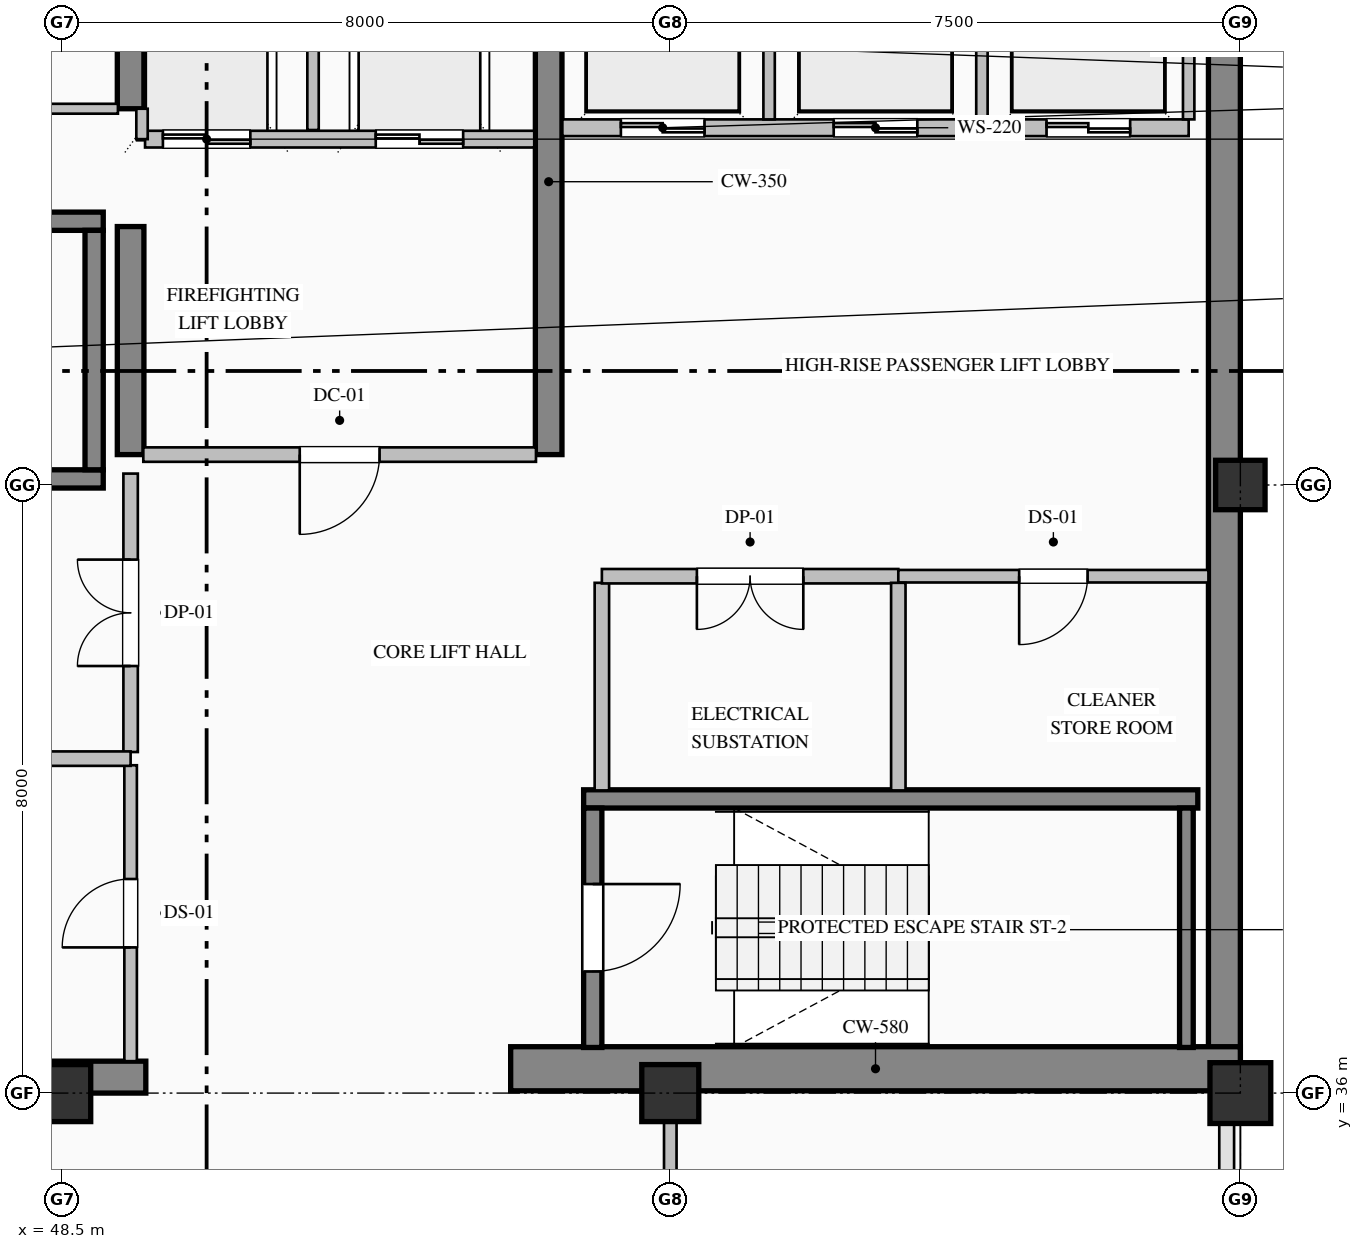
"""IFC4 building model, lengths in metres.
Left out: names, types, materials, properties, quantities, classifications, styles, units other than length and angle.
Written with IfcOpenShell. Run it as: python <this file> out.ifc"""

import sys

from ifc_helpers import new_model, si_unit, direction, frame, frame_2d, origin, origin_2d, place, context, subcontext, project, spatial, rectangle, hollow_rectangle, extrude, element, fill, save


model = new_model("IFC4")
c1 = context("Model", 3, precision=1e-05, world=origin(), true_north=direction((0.0, 1.0)))
c2 = subcontext(c1, "Body", "Model", "MODEL_VIEW")
j1 = project(units=[si_unit("LENGTHUNIT", "METRE"), si_unit("PLANEANGLEUNIT", "RADIAN")], contexts=[c1])
p1 = place(None, origin())
s1 = spatial("IfcSite", under=j1, at=p1, CompositionType="ELEMENT")
p2 = place(p1, origin())
s2 = spatial("IfcBuilding", under=s1, at=p2, CompositionType="ELEMENT")
p3 = place(p2, frame((0.0, 0.0, 299.2)))
s3 = spatial("IfcBuildingStorey", under=s2, at=p3, CompositionType="ELEMENT", Elevation=299.2)
p4 = place(p3, frame((63.79, 36.32, 0.0), z_axis=(0.0, 0.0, 1.0), x_axis=(0.0, 1.0, 0.0)))
e1 = element("IfcWall", 1, at=p4, inside=s3, PredefinedType="SHEAR", context=c2, shape_type="SweptSolid", body=[
    extrude(rectangle(XDim=15.26, YDim=0.42, at=frame_2d((7.63, 0.0))), origin(), (0.0, 0.0, 1.0), 3.785),
])
p5 = place(p3, frame((40.5, 36.21, 0.0), z_axis=(0.0, 0.0, 1.0), x_axis=(1.0, 0.0, 0.0)))
e2 = element("IfcWall", 2, at=p5, inside=s3, PredefinedType="SHEAR", context=c2, shape_type="SweptSolid", body=[
    extrude(rectangle(XDim=9.1, YDim=0.42, at=frame_2d((4.55, 0.0))), origin(), (0.0, 0.0, 1.0), 3.785),
])
p6 = place(p3, frame((54.4, 36.32, 0.0), z_axis=(0.0, 0.0, 1.0), x_axis=(1.0, 0.0, 0.0)))
e3 = element("IfcWall", 3, at=p6, inside=s3, PredefinedType="SHEAR", context=c2, shape_type="SweptSolid", body=[
    extrude(rectangle(XDim=9.6, YDim=0.58, at=frame_2d((4.8, 0.0))), origin(), (0.0, 0.0, 1.0), 4.0),
])
p7 = place(p3, frame((49.4, 44.4, 0.0), z_axis=(0.0, 0.0, 1.0), x_axis=(0.0, 1.0, 0.0)))
e4 = element("IfcWall", 4, at=p7, inside=s3, PredefinedType="SHEAR", context=c2, shape_type="SweptSolid", body=[
    extrude(rectangle(XDim=3.0, YDim=0.35, at=frame_2d((1.5, 0.0))), origin(), (0.0, 0.0, 1.0), 3.785),
])
p8 = place(p3, frame((49.4, 48.95, 0.0), z_axis=(0.0, 0.0, 1.0), x_axis=(0.0, 1.0, 0.0)))
e5 = element("IfcWall", 5, at=p8, inside=s3, PredefinedType="SHEAR", context=c2, shape_type="SweptSolid", body=[
    extrude(rectangle(XDim=2.63, YDim=0.35, at=frame_2d((1.315, 0.0))), origin(), (0.0, 0.0, 1.0), 3.785),
])
p9 = place(p3, frame((54.9, 44.4, 0.0), z_axis=(0.0, 0.0, 1.0), x_axis=(0.0, 1.0, 0.0)))
e6 = element("IfcWall", 6, at=p9, inside=s3, PredefinedType="SHEAR", context=c2, shape_type="SweptSolid", body=[
    extrude(rectangle(XDim=7.18, YDim=0.35, at=frame_2d((3.59, 0.0))), origin(), (0.0, 0.0, 1.0), 3.785),
])
for number, where, z_axis, x_axis in (
    (7, (48.5, 36.0, 0.0), (0.0, 0.0, 1.0), (1.0, 0.0, 0.0)),
    (8, (56.5, 36.0, 0.0), (0.0, 0.0, 1.0), (1.0, 0.0, 0.0)),
):
    element("IfcColumn", number, at=place(p3, frame(where, z_axis=z_axis, x_axis=x_axis)), inside=s3, PredefinedType="COLUMN", context=c2, shape_type="SweptSolid", body=[
        extrude(rectangle(XDim=0.75, YDim=0.75, at=origin_2d()), origin(), (0.0, 0.0, 1.0), 4.0),
    ])
p10 = place(p3, frame((64.0, 36.0, 0.0), z_axis=(0.0, 0.0, 1.0), x_axis=(1.0, 0.0, 0.0)))
e9 = element("IfcColumn", 9, at=p10, inside=s3, PredefinedType="COLUMN", context=c2, shape_type="SweptSolid", body=[
    extrude(hollow_rectangle(XDim=0.8, YDim=0.8, WallThickness=0.032, at=origin_2d()), origin(), (0.0, 0.0, 1.0), 4.0),
])
p11 = place(p3, frame((64.0, 44.0, 0.0), z_axis=(0.0, 0.0, 1.0), x_axis=(1.0, 0.0, 0.0)))
e10 = element("IfcColumn", 10, at=p11, inside=s3, PredefinedType="COLUMN", context=c2, shape_type="SweptSolid", body=[
    extrude(hollow_rectangle(XDim=0.65, YDim=0.65, WallThickness=0.028, at=origin_2d()), origin(), (0.0, 0.0, 1.0), 4.0),
])
for number, where, z_axis, x_axis in (
    (11, (40.96, 47.47, 0.0), (0.0, 0.0, 1.0), (1.0, 0.0, 0.0)),
    (12, (49.04, 44.08, 0.0), (0.0, 0.0, 1.0), (-1.0, 0.0, 0.0)),
):
    element("IfcWall", number, at=place(p3, frame(where, z_axis=z_axis, x_axis=x_axis)), inside=s3, PredefinedType="SOLIDWALL", context=c2, shape_type="SweptSolid", body=[
        extrude(rectangle(XDim=8.08, YDim=0.24, at=frame_2d((4.04, 0.0))), origin(), (0.0, 0.0, 1.0), 4.0),
    ])
p12 = place(p3, frame((48.92, 44.2, 0.0), z_axis=(0.0, 0.0, 1.0), x_axis=(0.0, 1.0, 0.0)))
e13 = element("IfcWall", 13, at=p12, inside=s3, PredefinedType="SOLIDWALL", context=c2, shape_type="SweptSolid", body=[
    extrude(rectangle(XDim=3.15, YDim=0.24, at=frame_2d((1.575, 0.0))), origin(), (0.0, 0.0, 1.0), 4.0),
])
p13 = place(p3, frame((55.36, 39.87, 0.0), z_axis=(0.0, 0.0, 1.0), x_axis=(1.0, 0.0, 0.0)))
e14 = element("IfcWall", 14, at=p13, inside=s3, PredefinedType="SOLIDWALL", context=c2, shape_type="SweptSolid", body=[
    extrude(rectangle(XDim=8.08, YDim=0.24, at=frame_2d((4.04, 0.0))), origin(), (0.0, 0.0, 1.0), 4.0),
])
p14 = place(p3, frame((55.48, 39.75, 0.0), z_axis=(0.0, 0.0, 1.0), x_axis=(0.0, -1.0, 0.0)))
e15 = element("IfcWall", 15, at=p14, inside=s3, PredefinedType="SOLIDWALL", context=c2, shape_type="SweptSolid", body=[
    extrude(rectangle(XDim=3.15, YDim=0.24, at=frame_2d((1.575, 0.0))), origin(), (0.0, 0.0, 1.0), 4.0),
])
p15 = place(p14, frame((1.0, 0.0, 0.0)))
e16 = element("IfcOpeningElement", 16, at=p15, cuts=e15, PredefinedType="OPENING", context=c2, shape_type="SweptSolid", body=[
    extrude(rectangle(XDim=1.15, YDim=2.2, at=frame_2d((0.575, 1.1))), frame((0.0, 0.13, 0.0), z_axis=(0.0, -1.0, 0.0), x_axis=(1.0, 0.0, 0.0)), (0.0, 0.0, 1.0), 0.26),
])
p16 = place(p3, frame((63.29, 36.6, 0.0), z_axis=(0.0, 0.0, 1.0), x_axis=(0.0, 1.0, 0.0)))
e17 = element("IfcWall", 17, at=p16, inside=s3, PredefinedType="SOLIDWALL", context=c2, shape_type="SweptSolid", body=[
    extrude(rectangle(XDim=3.15, YDim=0.18, at=frame_2d((1.575, 0.0))), origin(), (0.0, 0.0, 1.0), 4.0),
])
p17 = place(p3, frame((54.71, 48.55, 0.0), z_axis=(0.0, 0.0, 1.0), x_axis=(-1.0, 0.0, 0.0)))
e18 = element("IfcWall", 18, at=p17, inside=s3, PredefinedType="PARTITIONING", context=c2, shape_type="SweptSolid", body=[
    extrude(rectangle(XDim=5.12, YDim=0.22, at=frame_2d((2.56, 0.0))), origin(), (0.0, 0.0, 1.0), 3.785),
])
p18 = place(p17, frame((3.735, 0.0, 0.0)))
e19 = element("IfcOpeningElement", 19, at=p18, cuts=e18, PredefinedType="OPENING", context=c2, shape_type="SweptSolid", body=[
    extrude(rectangle(XDim=1.15, YDim=2.2, at=frame_2d((0.575, 1.1))), frame((0.0, 0.12, 0.0), z_axis=(0.0, -1.0, 0.0), x_axis=(1.0, 0.0, 0.0)), (0.0, 0.0, 1.0), 0.24),
])
p19 = place(p17, frame((0.935, 0.0, 0.0)))
e20 = element("IfcOpeningElement", 20, at=p19, cuts=e18, PredefinedType="OPENING", context=c2, shape_type="SweptSolid", body=[
    extrude(rectangle(XDim=1.15, YDim=2.2, at=frame_2d((0.575, 1.1))), frame((0.0, 0.12, 0.0), z_axis=(0.0, -1.0, 0.0), x_axis=(1.0, 0.0, 0.0)), (0.0, 0.0, 1.0), 0.24),
])
p20 = place(p3, frame((51.8, 48.67, 0.0), z_axis=(0.0, 0.0, 1.0), x_axis=(0.0, 1.0, 0.0)))
e21 = element("IfcWall", 21, at=p20, inside=s3, PredefinedType="PARTITIONING", context=c2, shape_type="SweptSolid", body=[
    extrude(rectangle(XDim=2.91, YDim=0.15, at=frame_2d((1.455, 0.0))), origin(), (0.0, 0.0, 1.0), 3.785),
])
p21 = place(p3, frame((49.55, 48.55, 0.0), z_axis=(0.0, 0.0, 1.0), x_axis=(0.0, 1.0, 0.0)))
e22 = element("IfcWall", 22, at=p21, inside=s3, PredefinedType="PARTITIONING", context=c2, shape_type="SweptSolid", body=[
    extrude(rectangle(XDim=0.4, YDim=0.15, at=frame_2d((0.2, 0.0))), origin(), (0.0, 0.0, 1.0), 3.785),
])
p22 = place(p3, frame((63.32, 48.7, 0.0), z_axis=(0.0, 0.0, 1.0), x_axis=(-1.0, 0.0, 0.0)))
e23 = element("IfcWall", 23, at=p22, inside=s3, PredefinedType="PARTITIONING", context=c2, shape_type="SweptSolid", body=[
    extrude(rectangle(XDim=8.24, YDim=0.22, at=frame_2d((4.12, 0.0))), origin(), (0.0, 0.0, 1.0), 3.785),
])
p23 = place(p22, frame((6.37, 0.0, 0.0)))
e24 = element("IfcOpeningElement", 24, at=p23, cuts=e23, PredefinedType="OPENING", context=c2, shape_type="SweptSolid", body=[
    extrude(rectangle(XDim=1.1, YDim=2.2, at=frame_2d((0.55, 1.1))), frame((0.0, 0.12, 0.0), z_axis=(0.0, -1.0, 0.0), x_axis=(1.0, 0.0, 0.0)), (0.0, 0.0, 1.0), 0.24),
])
p24 = place(p22, frame((3.57, 0.0, 0.0)))
e25 = element("IfcOpeningElement", 25, at=p24, cuts=e23, PredefinedType="OPENING", context=c2, shape_type="SweptSolid", body=[
    extrude(rectangle(XDim=1.1, YDim=2.2, at=frame_2d((0.55, 1.1))), frame((0.0, 0.12, 0.0), z_axis=(0.0, -1.0, 0.0), x_axis=(1.0, 0.0, 0.0)), (0.0, 0.0, 1.0), 0.24),
])
p25 = place(p22, frame((0.77, 0.0, 0.0)))
e26 = element("IfcOpeningElement", 26, at=p25, cuts=e23, PredefinedType="OPENING", context=c2, shape_type="SweptSolid", body=[
    extrude(rectangle(XDim=1.1, YDim=2.2, at=frame_2d((0.55, 1.1))), frame((0.0, 0.12, 0.0), z_axis=(0.0, -1.0, 0.0), x_axis=(1.0, 0.0, 0.0)), (0.0, 0.0, 1.0), 0.24),
])
for number, where, z_axis, x_axis in (
    (27, (57.8, 48.81, 0.0), (0.0, 0.0, 1.0), (0.0, 1.0, 0.0)),
    (28, (60.6, 48.81, 0.0), (0.0, 0.0, 1.0), (0.0, 1.0, 0.0)),
    (29, (63.32, 48.81, 0.0), (0.0, 0.0, 1.0), (0.0, 1.0, 0.0)),
):
    element("IfcWall", number, at=place(p3, frame(where, z_axis=z_axis, x_axis=x_axis)), inside=s3, PredefinedType="PARTITIONING", context=c2, shape_type="SweptSolid", body=[
        extrude(rectangle(XDim=2.77, YDim=0.15, at=frame_2d((1.385, 0.0))), origin(), (0.0, 0.0, 1.0), 3.785),
    ])
p26 = place(p3, frame((45.2, 48.95, 0.0), z_axis=(0.0, 0.0, 1.0), x_axis=(1.0, 0.0, 0.0)))
e30 = element("IfcWall", 30, at=p26, inside=s3, PredefinedType="PARTITIONING", context=c2, shape_type="SweptSolid", body=[
    extrude(rectangle(XDim=4.033, YDim=0.13, at=frame_2d((2.017, 0.0))), origin(), (0.0, 0.0, 1.0), 3.785),
])
p27 = place(p26, frame((1.556, 0.0, 0.0)))
e31 = element("IfcOpeningElement", 31, at=p27, cuts=e30, PredefinedType="OPENING", context=c2, shape_type="SweptSolid", body=[
    extrude(rectangle(XDim=0.92, YDim=2.15, at=frame_2d((0.46, 1.075))), frame((0.0, 0.075, 0.0), z_axis=(0.0, -1.0, 0.0), x_axis=(1.0, 0.0, 0.0)), (0.0, 0.0, 1.0), 0.15),
])
p28 = place(p3, frame((54.733, 44.4, 0.0), z_axis=(0.0, 0.0, 1.0), x_axis=(-1.0, 0.0, 0.0)))
e32 = element("IfcWall", 32, at=p28, inside=s3, PredefinedType="PARTITIONING", context=c2, shape_type="SweptSolid", body=[
    extrude(rectangle(XDim=5.166, YDim=0.19, at=frame_2d((2.583, 0.0))), origin(), (0.0, 0.0, 1.0), 3.785),
])
p29 = place(p28, frame((2.058, 0.0, 0.0)))
e33 = element("IfcOpeningElement", 33, at=p29, cuts=e32, PredefinedType="OPENING", context=c2, shape_type="SweptSolid", body=[
    extrude(rectangle(XDim=1.05, YDim=2.15, at=frame_2d((0.525, 1.075))), frame((0.0, 0.105, 0.0), z_axis=(0.0, -1.0, 0.0), x_axis=(1.0, 0.0, 0.0)), (0.0, 0.0, 1.0), 0.21),
])
p30 = place(p3, frame((49.4, 36.42, 0.0), z_axis=(0.0, 0.0, 1.0), x_axis=(0.0, 1.0, 0.0)))
e34 = element("IfcWall", 34, at=p30, inside=s3, PredefinedType="PARTITIONING", context=c2, shape_type="SweptSolid", body=[
    extrude(rectangle(XDim=3.893, YDim=0.165, at=frame_2d((1.947, 0.0))), origin(), (0.0, 0.0, 1.0), 3.027),
])
p31 = place(p30, frame((1.497, 0.0, 0.0)))
e35 = element("IfcOpeningElement", 35, at=p31, cuts=e34, PredefinedType="OPENING", context=c2, shape_type="SweptSolid", body=[
    extrude(rectangle(XDim=0.9, YDim=2.15, at=frame_2d((0.45, 1.075))), frame((0.0, 0.093, 0.0), z_axis=(0.0, -1.0, 0.0), x_axis=(1.0, 0.0, 0.0)), (0.0, 0.0, 1.0), 0.185),
])
p32 = place(p3, frame((49.4, 40.487, 0.0), z_axis=(0.0, 0.0, 1.0), x_axis=(0.0, 1.0, 0.0)))
e36 = element("IfcWall", 36, at=p32, inside=s3, PredefinedType="PARTITIONING", context=c2, shape_type="SweptSolid", body=[
    extrude(rectangle(XDim=3.663, YDim=0.19, at=frame_2d((1.832, 0.0))), origin(), (0.0, 0.0, 1.0), 3.027),
])
p33 = place(p32, frame((1.132, 0.0, 0.0)))
e37 = element("IfcOpeningElement", 37, at=p33, cuts=e36, PredefinedType="OPENING", context=c2, shape_type="SweptSolid", body=[
    extrude(rectangle(XDim=1.4, YDim=2.25, at=frame_2d((0.7, 1.125))), frame((0.0, 0.105, 0.0), z_axis=(0.0, -1.0, 0.0), x_axis=(1.0, 0.0, 0.0)), (0.0, 0.0, 1.0), 0.21),
])
p34 = place(p3, frame((55.6, 42.713, 0.0), z_axis=(0.0, 0.0, 1.0), x_axis=(0.0, -1.0, 0.0)))
e38 = element("IfcWall", 38, at=p34, inside=s3, PredefinedType="PARTITIONING", context=c2, shape_type="SweptSolid", body=[
    extrude(rectangle(XDim=2.731, YDim=0.19, at=frame_2d((1.365, 0.0))), origin(), (0.0, 0.0, 1.0), 3.785),
])
p35 = place(p3, frame((40.92, 40.4, 0.0), z_axis=(0.0, 0.0, 1.0), x_axis=(1.0, 0.0, 0.0)))
e39 = element("IfcWall", 39, at=p35, inside=s3, PredefinedType="PARTITIONING", context=c2, shape_type="SweptSolid", body=[
    extrude(rectangle(XDim=8.48, YDim=0.19, at=frame_2d((4.24, 0.0))), origin(), (0.0, 0.0, 1.0), 3.785),
])
p36 = place(p3, frame((59.5, 42.8, 0.0), z_axis=(0.0, 0.0, 1.0), x_axis=(-1.0, 0.0, 0.0)))
e40 = element("IfcWall", 40, at=p36, inside=s3, PredefinedType="PARTITIONING", context=c2, shape_type="SweptSolid", body=[
    extrude(rectangle(XDim=3.9, YDim=0.19, at=frame_2d((1.95, 0.0))), origin(), (0.0, 0.0, 1.0), 3.785),
])
p37 = place(p36, frame((1.25, 0.0, 0.0)))
e41 = element("IfcOpeningElement", 41, at=p37, cuts=e40, PredefinedType="OPENING", context=c2, shape_type="SweptSolid", body=[
    extrude(rectangle(XDim=1.4, YDim=2.25, at=frame_2d((0.7, 1.125))), frame((0.0, 0.105, 0.0), z_axis=(0.0, -1.0, 0.0), x_axis=(1.0, 0.0, 0.0)), (0.0, 0.0, 1.0), 0.21),
])
p38 = place(p3, frame((63.58, 42.8, 0.0), z_axis=(0.0, 0.0, 1.0), x_axis=(-1.0, 0.0, 0.0)))
e42 = element("IfcWall", 42, at=p38, inside=s3, PredefinedType="PARTITIONING", context=c2, shape_type="SweptSolid", body=[
    extrude(rectangle(XDim=4.08, YDim=0.165, at=frame_2d((2.04, 0.0))), origin(), (0.0, 0.0, 1.0), 3.785),
])
p39 = place(p38, frame((1.59, 0.0, 0.0)))
e43 = element("IfcOpeningElement", 43, at=p39, cuts=e42, PredefinedType="OPENING", context=c2, shape_type="SweptSolid", body=[
    extrude(rectangle(XDim=0.9, YDim=2.15, at=frame_2d((0.45, 1.075))), frame((0.0, 0.093, 0.0), z_axis=(0.0, -1.0, 0.0), x_axis=(1.0, 0.0, 0.0)), (0.0, 0.0, 1.0), 0.185),
])
p40 = place(p3, frame((59.5, 42.713, 0.0), z_axis=(0.0, 0.0, 1.0), x_axis=(0.0, -1.0, 0.0)))
e44 = element("IfcWall", 44, at=p40, inside=s3, PredefinedType="PARTITIONING", context=c2, shape_type="SweptSolid", body=[
    extrude(rectangle(XDim=2.731, YDim=0.19, at=frame_2d((1.365, 0.0))), origin(), (0.0, 0.0, 1.0), 3.785),
])
p41 = place(p3, frame((56.5, 36.0, 0.0), z_axis=(0.0, 0.0, 1.0), x_axis=(0.0, -1.0, 0.0)))
e45 = element("IfcWall", 45, at=p41, inside=s3, PredefinedType="PARTITIONING", context=c2, shape_type="SweptSolid", body=[
    extrude(rectangle(XDim=2.325, YDim=0.165, at=frame_2d((1.163, 0.0))), origin(), (0.0, 0.0, 1.0), 3.177),
])
p42 = place(p15, origin())
e46 = element("IfcDoor", 46, at=p42, inside=s3, OperationType="SINGLE_SWING_LEFT", PredefinedType="DOOR", context=c2, shape_type="SweptSolid", body=[
    extrude(rectangle(XDim=1.15, YDim=2.2, at=frame_2d((0.575, 1.1))), frame((0.0, 0.025, 0.0), z_axis=(0.0, -1.0, 0.0), x_axis=(1.0, 0.0, 0.0)), (0.0, 0.0, 1.0), 0.05),
])
fill(e16, e46)
p43 = place(p18, origin())
e47 = element("IfcDoor", 47, at=p43, inside=s3, OperationType="DOUBLE_DOOR_SLIDING", PredefinedType="DOOR", context=c2, shape_type="SweptSolid", body=[
    extrude(rectangle(XDim=1.15, YDim=2.2, at=frame_2d((0.575, 1.1))), frame((0.0, 0.025, 0.0), z_axis=(0.0, -1.0, 0.0), x_axis=(1.0, 0.0, 0.0)), (0.0, 0.0, 1.0), 0.05),
])
fill(e19, e47)
p44 = place(p19, origin())
e48 = element("IfcDoor", 48, at=p44, inside=s3, OperationType="DOUBLE_DOOR_SLIDING", PredefinedType="DOOR", context=c2, shape_type="SweptSolid", body=[
    extrude(rectangle(XDim=1.15, YDim=2.2, at=frame_2d((0.575, 1.1))), frame((0.0, 0.025, 0.0), z_axis=(0.0, -1.0, 0.0), x_axis=(1.0, 0.0, 0.0)), (0.0, 0.0, 1.0), 0.05),
])
fill(e20, e48)
p45 = place(p23, origin())
e49 = element("IfcDoor", 49, at=p45, inside=s3, OperationType="DOUBLE_DOOR_SLIDING", PredefinedType="DOOR", context=c2, shape_type="SweptSolid", body=[
    extrude(rectangle(XDim=1.1, YDim=2.2, at=frame_2d((0.55, 1.1))), frame((0.0, 0.025, 0.0), z_axis=(0.0, -1.0, 0.0), x_axis=(1.0, 0.0, 0.0)), (0.0, 0.0, 1.0), 0.05),
])
fill(e24, e49)
p46 = place(p24, origin())
e50 = element("IfcDoor", 50, at=p46, inside=s3, OperationType="DOUBLE_DOOR_SLIDING", PredefinedType="DOOR", context=c2, shape_type="SweptSolid", body=[
    extrude(rectangle(XDim=1.1, YDim=2.2, at=frame_2d((0.55, 1.1))), frame((0.0, 0.025, 0.0), z_axis=(0.0, -1.0, 0.0), x_axis=(1.0, 0.0, 0.0)), (0.0, 0.0, 1.0), 0.05),
])
fill(e25, e50)
p47 = place(p25, origin())
e51 = element("IfcDoor", 51, at=p47, inside=s3, OperationType="DOUBLE_DOOR_SLIDING", PredefinedType="DOOR", context=c2, shape_type="SweptSolid", body=[
    extrude(rectangle(XDim=1.1, YDim=2.2, at=frame_2d((0.55, 1.1))), frame((0.0, 0.025, 0.0), z_axis=(0.0, -1.0, 0.0), x_axis=(1.0, 0.0, 0.0)), (0.0, 0.0, 1.0), 0.05),
])
fill(e26, e51)
p48 = place(p29, origin())
e52 = element("IfcDoor", 52, at=p48, inside=s3, OperationType="SINGLE_SWING_RIGHT", PredefinedType="DOOR", context=c2, shape_type="SweptSolid", body=[
    extrude(rectangle(XDim=1.05, YDim=2.15, at=frame_2d((0.525, 1.075))), frame((0.0, 0.025, 0.0), z_axis=(0.0, -1.0, 0.0), x_axis=(1.0, 0.0, 0.0)), (0.0, 0.0, 1.0), 0.05),
])
fill(e33, e52)
p49 = place(p31, origin())
e53 = element("IfcDoor", 53, at=p49, inside=s3, OperationType="SINGLE_SWING_LEFT", PredefinedType="DOOR", context=c2, shape_type="SweptSolid", body=[
    extrude(rectangle(XDim=0.9, YDim=2.15, at=frame_2d((0.45, 1.075))), frame((0.0, 0.025, 0.0), z_axis=(0.0, -1.0, 0.0), x_axis=(1.0, 0.0, 0.0)), (0.0, 0.0, 1.0), 0.05),
])
fill(e35, e53)
p50 = place(p33, origin())
e54 = element("IfcDoor", 54, at=p50, inside=s3, OperationType="DOUBLE_DOOR_SINGLE_SWING", PredefinedType="DOOR", context=c2, shape_type="SweptSolid", body=[
    extrude(rectangle(XDim=1.4, YDim=2.25, at=frame_2d((0.7, 1.125))), frame((0.0, 0.025, 0.0), z_axis=(0.0, -1.0, 0.0), x_axis=(1.0, 0.0, 0.0)), (0.0, 0.0, 1.0), 0.05),
])
fill(e37, e54)
p51 = place(p37, origin())
e55 = element("IfcDoor", 55, at=p51, inside=s3, OperationType="DOUBLE_DOOR_SINGLE_SWING", PredefinedType="DOOR", context=c2, shape_type="SweptSolid", body=[
    extrude(rectangle(XDim=1.4, YDim=2.25, at=frame_2d((0.7, 1.125))), frame((0.0, 0.025, 0.0), z_axis=(0.0, -1.0, 0.0), x_axis=(1.0, 0.0, 0.0)), (0.0, 0.0, 1.0), 0.05),
])
fill(e41, e55)
p52 = place(p39, origin())
e56 = element("IfcDoor", 56, at=p52, inside=s3, OperationType="SINGLE_SWING_RIGHT", PredefinedType="DOOR", context=c2, shape_type="SweptSolid", body=[
    extrude(rectangle(XDim=0.9, YDim=2.15, at=frame_2d((0.45, 1.075))), frame((0.0, 0.025, 0.0), z_axis=(0.0, -1.0, 0.0), x_axis=(1.0, 0.0, 0.0)), (0.0, 0.0, 1.0), 0.05),
])
fill(e43, e56)
save(model, sys.argv[1])
